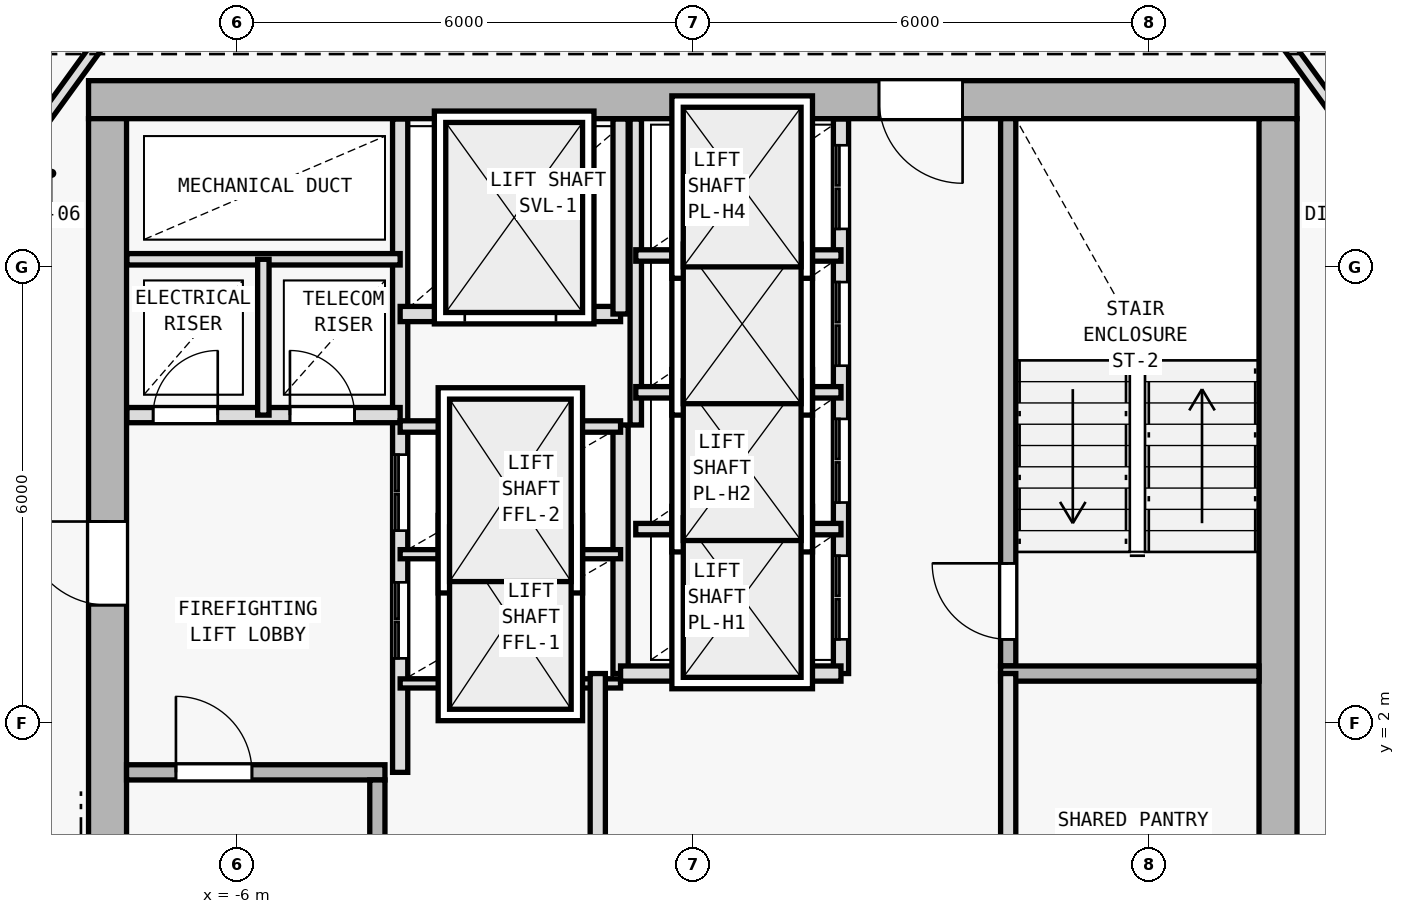
"""IFC4 building model, lengths in metres.
Left out: names, types, materials, properties, quantities, classifications, styles, units other than length and angle.
Written with IfcOpenShell. Run it as: python <this file> out.ifc"""

import sys

from ifc_helpers import new_model, si_unit, direction, frame, frame_2d, origin, origin_2d, place, context, subcontext, project, spatial, rectangle, i_section, extrude, element, fill, save


model = new_model("IFC4")
c1 = context("Model", 3, precision=1e-05, world=origin(), true_north=direction((0.0, 1.0)))
c2 = subcontext(c1, "Body", "Model", "MODEL_VIEW")
j1 = project(units=[si_unit("LENGTHUNIT", "METRE"), si_unit("PLANEANGLEUNIT", "RADIAN")], contexts=[c1])
p1 = place(None, origin())
s1 = spatial("IfcSite", under=j1, at=p1, CompositionType="ELEMENT")
p2 = place(p1, origin())
s2 = spatial("IfcBuilding", under=s1, at=p2, CompositionType="ELEMENT")
p3 = place(p2, frame((0.0, 0.0, 258.0)))
s3 = spatial("IfcBuildingStorey", under=s2, at=p3, CompositionType="ELEMENT", Elevation=258.0)
for number, where, z_axis, x_axis in (
    (1, (7.7, 10.2, 0.0), (0.0, 0.0, 1.0), (1.0, 0.0, 0.0)),
    (2, (-7.7, 10.2, 0.0), (0.0, 0.0, 1.0), (1.0, 0.0, 0.0)),
    (3, (7.7, 0.4, 0.0), (0.0, 0.0, 1.0), (1.0, 0.0, 0.0)),
    (4, (-7.7, 2.0, 0.0), (0.0, 0.0, 1.0), (1.0, 0.0, 0.0)),
):
    element("IfcColumn", number, at=place(p3, frame(where, z_axis=z_axis, x_axis=x_axis)), inside=s3, PredefinedType="COLUMN", context=c2, shape_type="SweptSolid", body=[
        extrude(i_section(OverallWidth=0.374, OverallDepth=0.372, WebThickness=0.012, FlangeThickness=0.02, FilletRadius=0.015, at=origin_2d()), origin(), (0.0, 0.0, 1.0), 3.6),
    ])
p4 = place(p3, frame((7.95, 10.2, 0.0), z_axis=(0.0, 0.0, 1.0), x_axis=(-1.0, 0.0, 0.0)))
e5 = element("IfcWall", 5, at=p4, inside=s3, PredefinedType="SHEAR", context=c2, shape_type="SweptSolid", body=[
    extrude(rectangle(XDim=15.9, YDim=0.5, at=frame_2d((7.95, 0.0))), origin(), (0.0, 0.0, 1.0), 3.35),
])
p5 = place(p4, frame((4.4, 0.0, 0.0)))
e6 = element("IfcOpeningElement", 6, at=p5, cuts=e5, PredefinedType="OPENING", context=c2, shape_type="SweptSolid", body=[
    extrude(rectangle(XDim=1.1, YDim=2.15, at=frame_2d((0.55, 1.075))), frame((0.0, 0.26, 0.0), z_axis=(0.0, -1.0, 0.0), x_axis=(1.0, 0.0, 0.0)), (0.0, 0.0, 1.0), 0.52),
])
p6 = place(p3, frame((-7.7, -9.15, 0.0), z_axis=(0.0, 0.0, 1.0), x_axis=(0.0, 1.0, 0.0)))
e7 = element("IfcWall", 7, at=p6, inside=s3, PredefinedType="SHEAR", context=c2, shape_type="SweptSolid", body=[
    extrude(rectangle(XDim=19.1, YDim=0.5, at=frame_2d((9.55, 0.0))), origin(), (0.0, 0.0, 1.0), 3.35),
])
p7 = place(p6, frame((12.7, 0.0, 0.0)))
e8 = element("IfcOpeningElement", 8, at=p7, cuts=e7, PredefinedType="OPENING", context=c2, shape_type="SweptSolid", body=[
    extrude(rectangle(XDim=1.1, YDim=2.15, at=frame_2d((0.55, 1.075))), frame((0.0, 0.26, 0.0), z_axis=(0.0, -1.0, 0.0), x_axis=(1.0, 0.0, 0.0)), (0.0, 0.0, 1.0), 0.52),
])
p8 = place(p3, frame((7.7, 9.95, 0.0), z_axis=(0.0, 0.0, 1.0), x_axis=(0.0, -1.0, 0.0)))
e9 = element("IfcWall", 9, at=p8, inside=s3, PredefinedType="SHEAR", context=c2, shape_type="SweptSolid", body=[
    extrude(rectangle(XDim=19.1, YDim=0.5, at=frame_2d((9.55, 0.0))), origin(), (0.0, 0.0, 1.0), 3.35),
])
p9 = place(p3, frame((-7.45, 1.35, 0.0), z_axis=(0.0, 0.0, 1.0), x_axis=(1.0, 0.0, 0.0)))
e10 = element("IfcWall", 10, at=p9, inside=s3, PredefinedType="SOLIDWALL", context=c2, shape_type="SweptSolid", body=[
    extrude(rectangle(XDim=3.4, YDim=0.2, at=frame_2d((1.7, 0.0))), origin(), (0.0, 0.0, 1.0), 3.35),
])
p10 = place(p9, frame((0.65, 0.0, 0.0)))
e11 = element("IfcOpeningElement", 11, at=p10, cuts=e10, PredefinedType="OPENING", context=c2, shape_type="SweptSolid", body=[
    extrude(rectangle(XDim=1.0, YDim=2.15, at=frame_2d((0.5, 1.075))), frame((0.0, 0.11, 0.0), z_axis=(0.0, -1.0, 0.0), x_axis=(1.0, 0.0, 0.0)), (0.0, 0.0, 1.0), 0.22),
])
p11 = place(p3, frame((-4.15, -5.95, 0.0), z_axis=(0.0, 0.0, 1.0), x_axis=(0.0, 1.0, 0.0)))
e12 = element("IfcWall", 12, at=p11, inside=s3, PredefinedType="SOLIDWALL", context=c2, shape_type="SweptSolid", body=[
    extrude(rectangle(XDim=7.2, YDim=0.2, at=frame_2d((3.6, 0.0))), origin(), (0.0, 0.0, 1.0), 3.35),
])
p12 = place(p3, frame((-3.85, 1.35, 0.0), z_axis=(0.0, 0.0, 1.0), x_axis=(0.0, 1.0, 0.0)))
e13 = element("IfcWall", 13, at=p12, inside=s3, PredefinedType="SOLIDWALL", context=c2, shape_type="SweptSolid", body=[
    extrude(rectangle(XDim=8.595, YDim=0.2, at=frame_2d((4.297, 0.0))), origin(), (0.0, 0.0, 1.0), 3.35),
])
p13 = place(p12, frame((1.5, 0.0, 0.0)))
e14 = element("IfcOpeningElement", 14, at=p13, cuts=e13, PredefinedType="OPENING", context=c2, shape_type="SweptSolid", body=[
    extrude(rectangle(XDim=1.0, YDim=2.15, at=frame_2d((0.5, 1.075))), frame((0.0, 0.11, 0.0), z_axis=(0.0, -1.0, 0.0), x_axis=(1.0, 0.0, 0.0)), (0.0, 0.0, 1.0), 0.22),
])
p14 = place(p12, frame((3.18, 0.0, 0.0)))
e15 = element("IfcOpeningElement", 15, at=p14, cuts=e13, PredefinedType="OPENING", context=c2, shape_type="SweptSolid", body=[
    extrude(rectangle(XDim=1.0, YDim=2.15, at=frame_2d((0.5, 1.075))), frame((0.0, 0.11, 0.0), z_axis=(0.0, -1.0, 0.0), x_axis=(1.0, 0.0, 0.0)), (0.0, 0.0, 1.0), 0.22),
])
p15 = place(p3, frame((-7.445, 6.05, 0.0), z_axis=(0.0, 0.0, 1.0), x_axis=(1.0, 0.0, 0.0)))
e16 = element("IfcWall", 16, at=p15, inside=s3, PredefinedType="SOLIDWALL", context=c2, shape_type="SweptSolid", body=[
    extrude(rectangle(XDim=3.595, YDim=0.2, at=frame_2d((1.797, 0.0))), origin(), (0.0, 0.0, 1.0), 3.35),
])
p16 = place(p15, frame((0.345, 0.0, 0.0)))
e17 = element("IfcOpeningElement", 17, at=p16, cuts=e16, PredefinedType="OPENING", context=c2, shape_type="SweptSolid", body=[
    extrude(rectangle(XDim=0.85, YDim=2.1, at=frame_2d((0.425, 1.05))), frame((0.0, 0.11, 0.0), z_axis=(0.0, -1.0, 0.0), x_axis=(1.0, 0.0, 0.0)), (0.0, 0.0, 1.0), 0.22),
])
p17 = place(p15, frame((2.145, 0.0, 0.0)))
e18 = element("IfcOpeningElement", 18, at=p17, cuts=e16, PredefinedType="OPENING", context=c2, shape_type="SweptSolid", body=[
    extrude(rectangle(XDim=0.85, YDim=2.1, at=frame_2d((0.425, 1.05))), frame((0.0, 0.11, 0.0), z_axis=(0.0, -1.0, 0.0), x_axis=(1.0, 0.0, 0.0)), (0.0, 0.0, 1.0), 0.22),
])
p18 = place(p3, frame((-7.445, 8.1, 0.0), z_axis=(0.0, 0.0, 1.0), x_axis=(1.0, 0.0, 0.0)))
e19 = element("IfcWall", 19, at=p18, inside=s3, PredefinedType="PARTITIONING", context=c2, shape_type="SweptSolid", body=[
    extrude(rectangle(XDim=3.595, YDim=0.15, at=frame_2d((1.797, 0.0))), origin(), (0.0, 0.0, 1.0), 3.35),
])
p19 = place(p3, frame((-5.65, 6.05, 0.0), z_axis=(0.0, 0.0, 1.0), x_axis=(0.0, 1.0, 0.0)))
e20 = element("IfcWall", 20, at=p19, inside=s3, PredefinedType="PARTITIONING", context=c2, shape_type="SweptSolid", body=[
    extrude(rectangle(XDim=2.05, YDim=0.15, at=frame_2d((1.025, 0.0))), origin(), (0.0, 0.0, 1.0), 3.35),
])
p20 = place(p3, frame((4.15, 2.75, 0.0), z_axis=(0.0, 0.0, 1.0), x_axis=(0.0, 1.0, 0.0)))
e21 = element("IfcWall", 21, at=p20, inside=s3, PredefinedType="SOLIDWALL", context=c2, shape_type="SweptSolid", body=[
    extrude(rectangle(XDim=7.2, YDim=0.2, at=frame_2d((3.6, 0.0))), origin(), (0.0, 0.0, 1.0), 3.35),
])
p21 = place(p20, frame((0.35, 0.0, 0.0)))
e22 = element("IfcOpeningElement", 22, at=p21, cuts=e21, PredefinedType="OPENING", context=c2, shape_type="SweptSolid", body=[
    extrude(rectangle(XDim=1.0, YDim=2.15, at=frame_2d((0.5, 1.075))), frame((0.0, 0.11, 0.0), z_axis=(0.0, -1.0, 0.0), x_axis=(1.0, 0.0, 0.0)), (0.0, 0.0, 1.0), 0.22),
])
p22 = place(p3, frame((4.05, 2.65, 0.0), z_axis=(0.0, 0.0, 1.0), x_axis=(1.0, 0.0, 0.0)))
e23 = element("IfcWall", 23, at=p22, inside=s3, PredefinedType="SOLIDWALL", context=c2, shape_type="SweptSolid", body=[
    extrude(rectangle(XDim=3.4, YDim=0.2, at=frame_2d((1.7, 0.0))), origin(), (0.0, 0.0, 1.0), 3.35),
])
p23 = place(p3, frame((-0.95, 2.65, 0.0), z_axis=(0.0, 0.0, 1.0), x_axis=(0.0, 1.0, 0.0)))
e24 = element("IfcWall", 24, at=p23, inside=s3, PredefinedType="SOLIDWALL", context=c2, shape_type="SweptSolid", body=[
    extrude(rectangle(XDim=3.27, YDim=0.2, at=frame_2d((1.635, 0.0))), origin(), (0.0, 0.0, 1.0), 3.35),
])
for number, where, z_axis, x_axis in (
    (25, (-3.85, 2.52, 0.0), (0.0, 0.0, 1.0), (1.0, 0.0, 0.0)),
    (26, (-3.85, 4.22, 0.0), (0.0, 0.0, 1.0), (1.0, 0.0, 0.0)),
):
    element("IfcWall", number, at=place(p3, frame(where, z_axis=z_axis, x_axis=x_axis)), inside=s3, PredefinedType="PARTITIONING", context=c2, shape_type="SweptSolid", body=[
        extrude(rectangle(XDim=2.9, YDim=0.12, at=frame_2d((1.45, 0.0))), origin(), (0.0, 0.0, 1.0), 3.35),
    ])
p24 = place(p3, frame((-3.85, 5.9, 0.0), z_axis=(0.0, 0.0, 1.0), x_axis=(1.0, 0.0, 0.0)))
e27 = element("IfcWall", 27, at=p24, inside=s3, PredefinedType="PARTITIONING", context=c2, shape_type="SweptSolid", body=[
    extrude(rectangle(XDim=2.9, YDim=0.15, at=frame_2d((1.45, 0.0))), origin(), (0.0, 0.0, 1.0), 3.35),
])
p25 = place(p3, frame((-3.85, 7.38, 0.0), z_axis=(0.0, 0.0, 1.0), x_axis=(1.0, 0.0, 0.0)))
e28 = element("IfcWall", 28, at=p25, inside=s3, PredefinedType="SOLIDWALL", context=c2, shape_type="SweptSolid", body=[
    extrude(rectangle(XDim=2.9, YDim=0.2, at=frame_2d((1.45, 0.0))), origin(), (0.0, 0.0, 1.0), 3.35),
])
p26 = place(p25, frame((0.85, 0.0, 0.0)))
e29 = element("IfcOpeningElement", 29, at=p26, cuts=e28, PredefinedType="OPENING", context=c2, shape_type="SweptSolid", body=[
    extrude(rectangle(XDim=1.2, YDim=2.2, at=frame_2d((0.6, 1.1))), frame((0.0, 0.11, 0.0), z_axis=(0.0, -1.0, 0.0), x_axis=(1.0, 0.0, 0.0)), (0.0, 0.0, 1.0), 0.22),
])
p27 = place(p3, frame((-0.95, 7.38, 0.0), z_axis=(0.0, 0.0, 1.0), x_axis=(0.0, 1.0, 0.0)))
e30 = element("IfcWall", 30, at=p27, inside=s3, PredefinedType="SOLIDWALL", context=c2, shape_type="SweptSolid", body=[
    extrude(rectangle(XDim=2.565, YDim=0.2, at=frame_2d((1.283, 0.0))), origin(), (0.0, 0.0, 1.0), 3.35),
])
p28 = place(p3, frame((4.15, -6.05, 0.0), z_axis=(0.0, 0.0, 1.0), x_axis=(0.0, 1.0, 0.0)))
e31 = element("IfcWall", 31, at=p28, inside=s3, PredefinedType="SOLIDWALL", context=c2, shape_type="SweptSolid", body=[
    extrude(rectangle(XDim=8.7, YDim=0.2, at=frame_2d((4.35, 0.0))), origin(), (0.0, 0.0, 1.0), 3.35),
])
p29 = place(p28, frame((3.6, 0.0, 0.0)))
e32 = element("IfcOpeningElement", 32, at=p29, cuts=e31, PredefinedType="OPENING", context=c2, shape_type="SweptSolid", body=[
    extrude(rectangle(XDim=0.95, YDim=2.1, at=frame_2d((0.475, 1.05))), frame((0.0, 0.11, 0.0), z_axis=(0.0, -1.0, 0.0), x_axis=(1.0, 0.0, 0.0)), (0.0, 0.0, 1.0), 0.22),
])
p30 = place(p3, frame((-1.25, -6.05, 0.0), z_axis=(0.0, 0.0, 1.0), x_axis=(0.0, 1.0, 0.0)))
e33 = element("IfcWall", 33, at=p30, inside=s3, PredefinedType="SOLIDWALL", context=c2, shape_type="SweptSolid", body=[
    extrude(rectangle(XDim=8.7, YDim=0.2, at=frame_2d((4.35, 0.0))), origin(), (0.0, 0.0, 1.0), 3.35),
])
p31 = place(p30, frame((3.4, 0.0, 0.0)))
e34 = element("IfcOpeningElement", 34, at=p31, cuts=e33, PredefinedType="OPENING", context=c2, shape_type="SweptSolid", body=[
    extrude(rectangle(XDim=0.95, YDim=2.1, at=frame_2d((0.475, 1.05))), frame((0.0, 0.11, 0.0), z_axis=(0.0, -1.0, 0.0), x_axis=(1.0, 0.0, 0.0)), (0.0, 0.0, 1.0), 0.22),
])
p32 = place(p3, frame((1.95, 2.65, 0.0), z_axis=(0.0, 0.0, 1.0), x_axis=(0.0, 1.0, 0.0)))
e35 = element("IfcWall", 35, at=p32, inside=s3, PredefinedType="SOLIDWALL", context=c2, shape_type="SweptSolid", body=[
    extrude(rectangle(XDim=7.295, YDim=0.2, at=frame_2d((3.647, 0.0))), origin(), (0.0, 0.0, 1.0), 3.35),
])
p33 = place(p32, frame((0.45, 0.0, 0.0)))
e36 = element("IfcOpeningElement", 36, at=p33, cuts=e35, PredefinedType="OPENING", context=c2, shape_type="SweptSolid", body=[
    extrude(rectangle(XDim=1.1, YDim=2.15, at=frame_2d((0.55, 1.075))), frame((0.0, 0.11, 0.0), z_axis=(0.0, -1.0, 0.0), x_axis=(1.0, 0.0, 0.0)), (0.0, 0.0, 1.0), 0.22),
])
p34 = place(p32, frame((2.25, 0.0, 0.0)))
e37 = element("IfcOpeningElement", 37, at=p34, cuts=e35, PredefinedType="OPENING", context=c2, shape_type="SweptSolid", body=[
    extrude(rectangle(XDim=1.1, YDim=2.15, at=frame_2d((0.55, 1.075))), frame((0.0, 0.11, 0.0), z_axis=(0.0, -1.0, 0.0), x_axis=(1.0, 0.0, 0.0)), (0.0, 0.0, 1.0), 0.22),
])
p35 = place(p32, frame((4.05, 0.0, 0.0)))
e38 = element("IfcOpeningElement", 38, at=p35, cuts=e35, PredefinedType="OPENING", context=c2, shape_type="SweptSolid", body=[
    extrude(rectangle(XDim=1.1, YDim=2.15, at=frame_2d((0.55, 1.075))), frame((0.0, 0.11, 0.0), z_axis=(0.0, -1.0, 0.0), x_axis=(1.0, 0.0, 0.0)), (0.0, 0.0, 1.0), 0.22),
])
p36 = place(p32, frame((5.85, 0.0, 0.0)))
e39 = element("IfcOpeningElement", 39, at=p36, cuts=e35, PredefinedType="OPENING", context=c2, shape_type="SweptSolid", body=[
    extrude(rectangle(XDim=1.1, YDim=2.15, at=frame_2d((0.55, 1.075))), frame((0.0, 0.11, 0.0), z_axis=(0.0, -1.0, 0.0), x_axis=(1.0, 0.0, 0.0)), (0.0, 0.0, 1.0), 0.22),
])
p37 = place(p3, frame((-0.95, 2.65, 0.0), z_axis=(0.0, 0.0, 1.0), x_axis=(1.0, 0.0, 0.0)))
e40 = element("IfcWall", 40, at=p37, inside=s3, PredefinedType="SOLIDWALL", context=c2, shape_type="SweptSolid", body=[
    extrude(rectangle(XDim=2.9, YDim=0.2, at=frame_2d((1.45, 0.0))), origin(), (0.0, 0.0, 1.0), 3.35),
])
p38 = place(p3, frame((-0.75, 5.92, 0.0), z_axis=(0.0, 0.0, 1.0), x_axis=(0.0, 1.0, 0.0)))
e41 = element("IfcWall", 41, at=p38, inside=s3, PredefinedType="PARTITIONING", context=c2, shape_type="SweptSolid", body=[
    extrude(rectangle(XDim=4.025, YDim=0.15, at=frame_2d((2.013, 0.0))), origin(), (0.0, 0.0, 1.0), 3.35),
])
for number, where, z_axis, x_axis in (
    (42, (-0.75, 4.55, 0.0), (0.0, 0.0, 1.0), (1.0, 0.0, 0.0)),
    (43, (-0.75, 6.35, 0.0), (0.0, 0.0, 1.0), (1.0, 0.0, 0.0)),
    (44, (-0.75, 8.15, 0.0), (0.0, 0.0, 1.0), (1.0, 0.0, 0.0)),
):
    element("IfcWall", number, at=place(p3, frame(where, z_axis=z_axis, x_axis=x_axis)), inside=s3, PredefinedType="PARTITIONING", context=c2, shape_type="SweptSolid", body=[
        extrude(rectangle(XDim=2.7, YDim=0.15, at=frame_2d((1.35, 0.0))), origin(), (0.0, 0.0, 1.0), 3.35),
    ])
p39 = place(p3, frame((-9.78, 8.226, 0.0), z_axis=(0.0, 0.0, 1.0), x_axis=(0.586956386413, 0.809618552436, 0.0)))
e45 = element("IfcWall", 45, at=p39, inside=s3, PredefinedType="PARTITIONING", context=c2, shape_type="SweptSolid", body=[
    extrude(rectangle(XDim=5.008, YDim=0.15, at=frame_2d((2.504, 0.0))), origin(), (0.0, 0.0, 1.0), 2.965),
])
p40 = place(p39, frame((1.154, 0.0, 0.0)))
e46 = element("IfcOpeningElement", 46, at=p40, cuts=e45, PredefinedType="OPENING", context=c2, shape_type="SweptSolid", body=[
    extrude(rectangle(XDim=0.9, YDim=2.1, at=frame_2d((0.45, 1.05))), frame((0.0, 0.085, 0.0), z_axis=(0.0, -1.0, 0.0), x_axis=(1.0, 0.0, 0.0)), (0.0, 0.0, 1.0), 0.17),
])
p41 = place(p3, frame((6.841, 12.28, 0.0), z_axis=(0.0, 0.0, 1.0), x_axis=(0.586956386413, -0.809618552436, 0.0)))
e47 = element("IfcWall", 47, at=p41, inside=s3, PredefinedType="PARTITIONING", context=c2, shape_type="SweptSolid", body=[
    extrude(rectangle(XDim=5.008, YDim=0.15, at=frame_2d((2.504, 0.0))), origin(), (0.0, 0.0, 1.0), 2.875),
])
p42 = place(p41, frame((2.954, 0.0, 0.0)))
e48 = element("IfcOpeningElement", 48, at=p42, cuts=e47, PredefinedType="OPENING", context=c2, shape_type="SweptSolid", body=[
    extrude(rectangle(XDim=0.9, YDim=2.1, at=frame_2d((0.45, 1.05))), frame((0.0, 0.085, 0.0), z_axis=(0.0, -1.0, 0.0), x_axis=(1.0, 0.0, 0.0)), (0.0, 0.0, 1.0), 0.17),
])
p43 = place(p7, origin())
e49 = element("IfcDoor", 49, at=p43, inside=s3, OperationType="SINGLE_SWING_RIGHT", PredefinedType="DOOR", context=c2, shape_type="SweptSolid", body=[
    extrude(rectangle(XDim=1.1, YDim=2.15, at=frame_2d((0.55, 1.075))), frame((0.0, 0.025, 0.0), z_axis=(0.0, -1.0, 0.0), x_axis=(1.0, 0.0, 0.0)), (0.0, 0.0, 1.0), 0.05),
])
fill(e8, e49)
p44 = place(p5, origin())
e50 = element("IfcDoor", 50, at=p44, inside=s3, OperationType="SINGLE_SWING_LEFT", PredefinedType="DOOR", context=c2, shape_type="SweptSolid", body=[
    extrude(rectangle(XDim=1.1, YDim=2.15, at=frame_2d((0.55, 1.075))), frame((0.0, 0.025, 0.0), z_axis=(0.0, -1.0, 0.0), x_axis=(1.0, 0.0, 0.0)), (0.0, 0.0, 1.0), 0.05),
])
fill(e6, e50)
p45 = place(p10, origin())
e51 = element("IfcDoor", 51, at=p45, inside=s3, OperationType="SINGLE_SWING_LEFT", PredefinedType="DOOR", context=c2, shape_type="SweptSolid", body=[
    extrude(rectangle(XDim=1.0, YDim=2.15, at=frame_2d((0.5, 1.075))), frame((0.0, 0.025, 0.0), z_axis=(0.0, -1.0, 0.0), x_axis=(1.0, 0.0, 0.0)), (0.0, 0.0, 1.0), 0.05),
])
fill(e11, e51)
p46 = place(p16, origin())
e52 = element("IfcDoor", 52, at=p46, inside=s3, OperationType="SINGLE_SWING_RIGHT", PredefinedType="DOOR", context=c2, shape_type="SweptSolid", body=[
    extrude(rectangle(XDim=0.85, YDim=2.1, at=frame_2d((0.425, 1.05))), frame((0.0, 0.025, 0.0), z_axis=(0.0, -1.0, 0.0), x_axis=(1.0, 0.0, 0.0)), (0.0, 0.0, 1.0), 0.05),
])
fill(e17, e52)
p47 = place(p17, origin())
e53 = element("IfcDoor", 53, at=p47, inside=s3, OperationType="SINGLE_SWING_LEFT", PredefinedType="DOOR", context=c2, shape_type="SweptSolid", body=[
    extrude(rectangle(XDim=0.85, YDim=2.1, at=frame_2d((0.425, 1.05))), frame((0.0, 0.025, 0.0), z_axis=(0.0, -1.0, 0.0), x_axis=(1.0, 0.0, 0.0)), (0.0, 0.0, 1.0), 0.05),
])
fill(e18, e53)
p48 = place(p21, origin())
e54 = element("IfcDoor", 54, at=p48, inside=s3, OperationType="SINGLE_SWING_RIGHT", PredefinedType="DOOR", context=c2, shape_type="SweptSolid", body=[
    extrude(rectangle(XDim=1.0, YDim=2.15, at=frame_2d((0.5, 1.075))), frame((0.0, 0.025, 0.0), z_axis=(0.0, -1.0, 0.0), x_axis=(1.0, 0.0, 0.0)), (0.0, 0.0, 1.0), 0.05),
])
fill(e22, e54)
p49 = place(p26, origin())
e55 = element("IfcDoor", 55, at=p49, inside=s3, OperationType="DOUBLE_DOOR_SLIDING", PredefinedType="DOOR", context=c2, shape_type="SweptSolid", body=[
    extrude(rectangle(XDim=1.2, YDim=2.2, at=frame_2d((0.6, 1.1))), frame((0.0, 0.025, 0.0), z_axis=(0.0, -1.0, 0.0), x_axis=(1.0, 0.0, 0.0)), (0.0, 0.0, 1.0), 0.05),
])
fill(e29, e55)
p50 = place(p33, origin())
e56 = element("IfcDoor", 56, at=p50, inside=s3, OperationType="DOUBLE_DOOR_SLIDING", PredefinedType="DOOR", context=c2, shape_type="SweptSolid", body=[
    extrude(rectangle(XDim=1.1, YDim=2.15, at=frame_2d((0.55, 1.075))), frame((0.0, 0.025, 0.0), z_axis=(0.0, -1.0, 0.0), x_axis=(1.0, 0.0, 0.0)), (0.0, 0.0, 1.0), 0.05),
])
fill(e36, e56)
p51 = place(p34, origin())
e57 = element("IfcDoor", 57, at=p51, inside=s3, OperationType="DOUBLE_DOOR_SLIDING", PredefinedType="DOOR", context=c2, shape_type="SweptSolid", body=[
    extrude(rectangle(XDim=1.1, YDim=2.15, at=frame_2d((0.55, 1.075))), frame((0.0, 0.025, 0.0), z_axis=(0.0, -1.0, 0.0), x_axis=(1.0, 0.0, 0.0)), (0.0, 0.0, 1.0), 0.05),
])
fill(e37, e57)
p52 = place(p35, origin())
e58 = element("IfcDoor", 58, at=p52, inside=s3, OperationType="DOUBLE_DOOR_SLIDING", PredefinedType="DOOR", context=c2, shape_type="SweptSolid", body=[
    extrude(rectangle(XDim=1.1, YDim=2.15, at=frame_2d((0.55, 1.075))), frame((0.0, 0.025, 0.0), z_axis=(0.0, -1.0, 0.0), x_axis=(1.0, 0.0, 0.0)), (0.0, 0.0, 1.0), 0.05),
])
fill(e38, e58)
p53 = place(p36, origin())
e59 = element("IfcDoor", 59, at=p53, inside=s3, OperationType="DOUBLE_DOOR_SLIDING", PredefinedType="DOOR", context=c2, shape_type="SweptSolid", body=[
    extrude(rectangle(XDim=1.1, YDim=2.15, at=frame_2d((0.55, 1.075))), frame((0.0, 0.025, 0.0), z_axis=(0.0, -1.0, 0.0), x_axis=(1.0, 0.0, 0.0)), (0.0, 0.0, 1.0), 0.05),
])
fill(e39, e59)
p54 = place(p13, origin())
e60 = element("IfcDoor", 60, at=p54, inside=s3, OperationType="DOUBLE_DOOR_SLIDING", PredefinedType="DOOR", context=c2, shape_type="SweptSolid", body=[
    extrude(rectangle(XDim=1.0, YDim=2.15, at=frame_2d((0.5, 1.075))), frame((0.0, 0.025, 0.0), z_axis=(0.0, -1.0, 0.0), x_axis=(1.0, 0.0, 0.0)), (0.0, 0.0, 1.0), 0.05),
])
fill(e14, e60)
p55 = place(p14, origin())
e61 = element("IfcDoor", 61, at=p55, inside=s3, OperationType="DOUBLE_DOOR_SLIDING", PredefinedType="DOOR", context=c2, shape_type="SweptSolid", body=[
    extrude(rectangle(XDim=1.0, YDim=2.15, at=frame_2d((0.5, 1.075))), frame((0.0, 0.025, 0.0), z_axis=(0.0, -1.0, 0.0), x_axis=(1.0, 0.0, 0.0)), (0.0, 0.0, 1.0), 0.05),
])
fill(e15, e61)
save(model, sys.argv[1])
